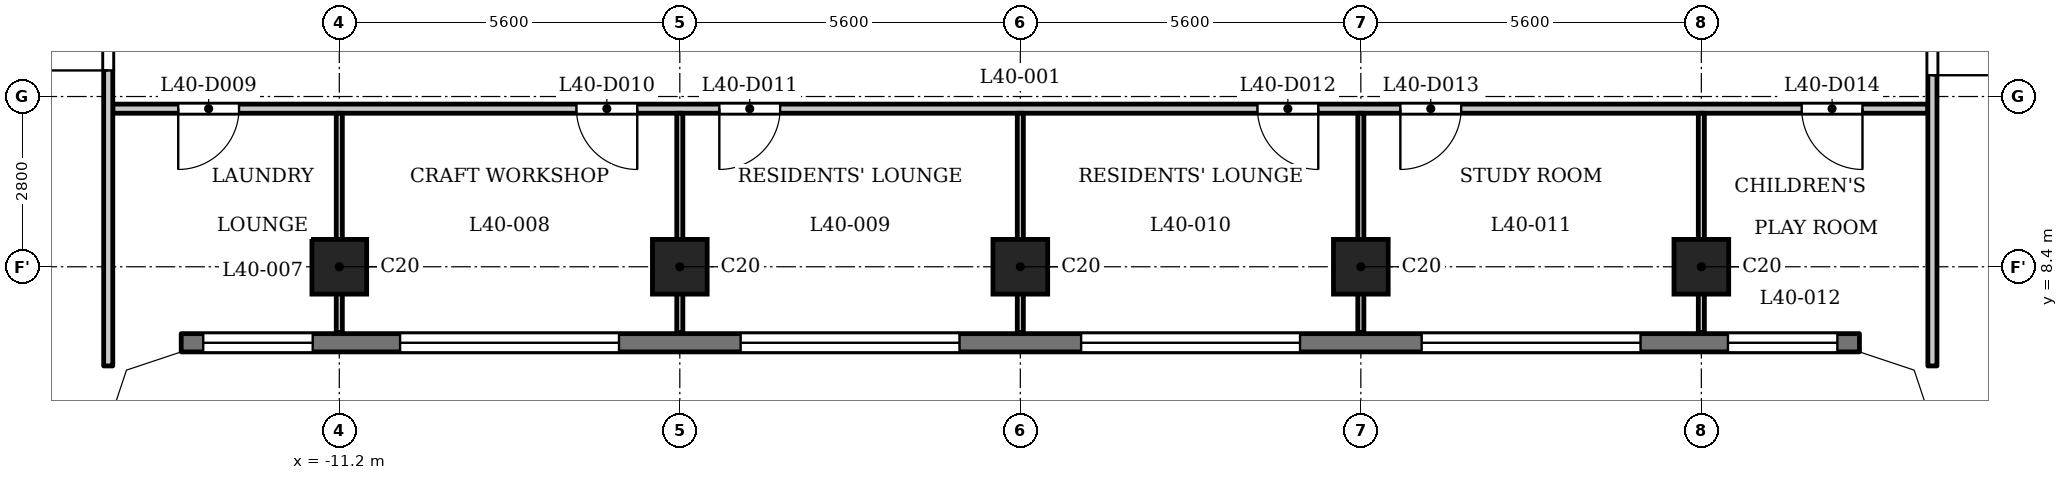
"""IFC4 building model, lengths in metres.
Left out: names, types, materials, properties, quantities, classifications, styles, units other than length and angle.
Written with IfcOpenShell. Run it as: python <this file> out.ifc"""

import sys

from ifc_helpers import new_model, si_unit, direction, frame, frame_2d, origin, origin_2d, place, context, subcontext, project, spatial, polyline, rectangle, outline, extrude, element, fill, save


model = new_model("IFC4")
c1 = context("Model", 3, precision=1e-05, world=origin(), true_north=direction((0.0, 1.0)))
c2 = subcontext(c1, "Body", "Model", "MODEL_VIEW")
j1 = project(units=[si_unit("LENGTHUNIT", "METRE"), si_unit("PLANEANGLEUNIT", "RADIAN")], contexts=[c1])
p1 = place(None, origin())
s1 = spatial("IfcSite", under=j1, at=p1, CompositionType="ELEMENT")
p2 = place(p1, origin())
s2 = spatial("IfcBuilding", under=s1, at=p2, CompositionType="ELEMENT")
p3 = place(p2, frame((0.0, 0.0, 157.1)))
s3 = spatial("IfcBuildingStorey", under=s2, at=p3, CompositionType="ELEMENT", Elevation=157.1)
for number, where, z_axis, x_axis in (
    (1, (-11.2, 8.4, 0.0), (0.0, 0.0, 1.0), (1.0, 0.0, 0.0)),
    (2, (-5.6, 8.4, 0.0), (0.0, 0.0, 1.0), (1.0, 0.0, 0.0)),
    (3, (0.0, 8.4, 0.0), (0.0, 0.0, 1.0), (1.0, 0.0, 0.0)),
    (4, (5.6, 8.4, 0.0), (0.0, 0.0, 1.0), (1.0, 0.0, 0.0)),
    (5, (11.2, 8.4, 0.0), (0.0, 0.0, 1.0), (1.0, 0.0, 0.0)),
):
    element("IfcColumn", number, at=place(p3, frame(where, z_axis=z_axis, x_axis=x_axis)), inside=s3, PredefinedType="COLUMN", context=c2, shape_type="SweptSolid", body=[
        extrude(rectangle(XDim=0.9, YDim=0.9, at=origin_2d()), origin(), (0.0, 0.0, 1.0), 3.5),
    ])
p4 = place(p3, frame((-13.8, 7.15, 0.0), z_axis=(0.0, 0.0, 1.0), x_axis=(1.0, 0.0, 0.0)))
e6 = element("IfcWall", 6, at=p4, inside=s3, PredefinedType="SOLIDWALL", context=c2, shape_type="SweptSolid", body=[
    extrude(rectangle(XDim=27.6, YDim=0.3, at=frame_2d((13.8, 0.0))), origin(), (0.0, 0.0, 1.0), 3.2),
])
p5 = place(p4, frame((0.363, 0.0, 0.9)))
e7 = element("IfcOpeningElement", 7, at=p5, cuts=e6, PredefinedType="OPENING", context=c2, shape_type="SweptSolid", body=[
    extrude(rectangle(XDim=1.8, YDim=1.25, at=frame_2d((0.9, 0.625))), frame((0.0, 0.16, 0.0), z_axis=(0.0, -1.0, 0.0), x_axis=(1.0, 0.0, 0.0)), (0.0, 0.0, 1.0), 0.32),
])
p6 = place(p4, frame((3.6, 0.0, 1.2)))
e8 = element("IfcOpeningElement", 8, at=p6, cuts=e6, PredefinedType="OPENING", context=c2, shape_type="SweptSolid", body=[
    extrude(rectangle(XDim=3.6, YDim=0.95, at=frame_2d((1.8, 0.475))), frame((0.0, 0.16, 0.0), z_axis=(0.0, -1.0, 0.0), x_axis=(1.0, 0.0, 0.0)), (0.0, 0.0, 1.0), 0.32),
])
p7 = place(p4, frame((9.2, 0.0, 1.2)))
e9 = element("IfcOpeningElement", 9, at=p7, cuts=e6, PredefinedType="OPENING", context=c2, shape_type="SweptSolid", body=[
    extrude(rectangle(XDim=3.6, YDim=0.95, at=frame_2d((1.8, 0.475))), frame((0.0, 0.16, 0.0), z_axis=(0.0, -1.0, 0.0), x_axis=(1.0, 0.0, 0.0)), (0.0, 0.0, 1.0), 0.32),
])
p8 = place(p4, frame((14.8, 0.0, 1.2)))
e10 = element("IfcOpeningElement", 10, at=p8, cuts=e6, PredefinedType="OPENING", context=c2, shape_type="SweptSolid", body=[
    extrude(rectangle(XDim=3.6, YDim=0.95, at=frame_2d((1.8, 0.475))), frame((0.0, 0.16, 0.0), z_axis=(0.0, -1.0, 0.0), x_axis=(1.0, 0.0, 0.0)), (0.0, 0.0, 1.0), 0.32),
])
p9 = place(p4, frame((20.4, 0.0, 1.2)))
e11 = element("IfcOpeningElement", 11, at=p9, cuts=e6, PredefinedType="OPENING", context=c2, shape_type="SweptSolid", body=[
    extrude(rectangle(XDim=3.6, YDim=0.95, at=frame_2d((1.8, 0.475))), frame((0.0, 0.16, 0.0), z_axis=(0.0, -1.0, 0.0), x_axis=(1.0, 0.0, 0.0)), (0.0, 0.0, 1.0), 0.32),
])
p10 = place(p4, frame((25.438, 0.0, 0.9)))
e12 = element("IfcOpeningElement", 12, at=p10, cuts=e6, PredefinedType="OPENING", context=c2, shape_type="SweptSolid", body=[
    extrude(rectangle(XDim=1.8, YDim=1.25, at=frame_2d((0.9, 0.625))), frame((0.0, 0.16, 0.0), z_axis=(0.0, -1.0, 0.0), x_axis=(1.0, 0.0, 0.0)), (0.0, 0.0, 1.0), 0.32),
])
p11 = place(p3, frame((-14.925, 11.0, 0.0), z_axis=(0.0, 0.0, 1.0), x_axis=(1.0, 0.0, 0.0)))
e13 = element("IfcWall", 13, at=p11, inside=s3, PredefinedType="PARTITIONING", context=c2, shape_type="SweptSolid", body=[
    extrude(rectangle(XDim=29.85, YDim=0.15, at=frame_2d((14.925, 0.0))), origin(), (0.0, 0.0, 1.0), 3.2),
])
p12 = place(p11, frame((1.076, 0.0, 0.0)))
e14 = element("IfcOpeningElement", 14, at=p12, cuts=e13, PredefinedType="OPENING", context=c2, shape_type="SweptSolid", body=[
    extrude(rectangle(XDim=1.0, YDim=2.1, at=frame_2d((0.5, 1.05))), frame((0.0, 0.085, 0.0), z_axis=(0.0, -1.0, 0.0), x_axis=(1.0, 0.0, 0.0)), (0.0, 0.0, 1.0), 0.17),
])
p13 = place(p11, frame((7.625, 0.0, 0.0)))
e15 = element("IfcOpeningElement", 15, at=p13, cuts=e13, PredefinedType="OPENING", context=c2, shape_type="SweptSolid", body=[
    extrude(rectangle(XDim=1.0, YDim=2.1, at=frame_2d((0.5, 1.05))), frame((0.0, 0.085, 0.0), z_axis=(0.0, -1.0, 0.0), x_axis=(1.0, 0.0, 0.0)), (0.0, 0.0, 1.0), 0.17),
])
p14 = place(p11, frame((9.975, 0.0, 0.0)))
e16 = element("IfcOpeningElement", 16, at=p14, cuts=e13, PredefinedType="OPENING", context=c2, shape_type="SweptSolid", body=[
    extrude(rectangle(XDim=1.0, YDim=2.1, at=frame_2d((0.5, 1.05))), frame((0.0, 0.085, 0.0), z_axis=(0.0, -1.0, 0.0), x_axis=(1.0, 0.0, 0.0)), (0.0, 0.0, 1.0), 0.17),
])
p15 = place(p11, frame((18.825, 0.0, 0.0)))
e17 = element("IfcOpeningElement", 17, at=p15, cuts=e13, PredefinedType="OPENING", context=c2, shape_type="SweptSolid", body=[
    extrude(rectangle(XDim=1.0, YDim=2.1, at=frame_2d((0.5, 1.05))), frame((0.0, 0.085, 0.0), z_axis=(0.0, -1.0, 0.0), x_axis=(1.0, 0.0, 0.0)), (0.0, 0.0, 1.0), 0.17),
])
p16 = place(p11, frame((21.175, 0.0, 0.0)))
e18 = element("IfcOpeningElement", 18, at=p16, cuts=e13, PredefinedType="OPENING", context=c2, shape_type="SweptSolid", body=[
    extrude(rectangle(XDim=1.0, YDim=2.1, at=frame_2d((0.5, 1.05))), frame((0.0, 0.085, 0.0), z_axis=(0.0, -1.0, 0.0), x_axis=(1.0, 0.0, 0.0)), (0.0, 0.0, 1.0), 0.17),
])
p17 = place(p11, frame((27.775, 0.0, 0.0)))
e19 = element("IfcOpeningElement", 19, at=p17, cuts=e13, PredefinedType="OPENING", context=c2, shape_type="SweptSolid", body=[
    extrude(rectangle(XDim=1.0, YDim=2.1, at=frame_2d((0.5, 1.05))), frame((0.0, 0.085, 0.0), z_axis=(0.0, -1.0, 0.0), x_axis=(1.0, 0.0, 0.0)), (0.0, 0.0, 1.0), 0.17),
])
p18 = place(p3, frame((-15.0, 6.769, 0.0), z_axis=(0.0, 0.0, 1.0), x_axis=(0.0, 1.0, 0.0)))
e20 = element("IfcWall", 20, at=p18, inside=s3, PredefinedType="PARTITIONING", context=c2, shape_type="SweptSolid", body=[
    extrude(rectangle(XDim=6.356, YDim=0.15, at=frame_2d((3.178, 0.0))), origin(), (0.0, 0.0, 1.0), 3.2),
])
p19 = place(p18, frame((4.86, 0.0, 0.0)))
e21 = element("IfcOpeningElement", 21, at=p19, cuts=e20, PredefinedType="OPENING", context=c2, shape_type="SweptSolid", body=[
    extrude(rectangle(XDim=1.0, YDim=2.1, at=frame_2d((0.5, 1.05))), frame((0.0, 0.085, 0.0), z_axis=(0.0, -1.0, 0.0), x_axis=(1.0, 0.0, 0.0)), (0.0, 0.0, 1.0), 0.17),
])
for number, where, z_axis, x_axis in (
    (22, (-11.2, 7.32, 0.0), (0.0, 0.0, 1.0), (0.0, 1.0, 0.0)),
    (23, (-5.6, 7.32, 0.0), (0.0, 0.0, 1.0), (0.0, 1.0, 0.0)),
    (24, (0.0, 7.32, 0.0), (0.0, 0.0, 1.0), (0.0, 1.0, 0.0)),
    (25, (5.6, 7.32, 0.0), (0.0, 0.0, 1.0), (0.0, 1.0, 0.0)),
    (26, (11.2, 7.32, 0.0), (0.0, 0.0, 1.0), (0.0, 1.0, 0.0)),
):
    element("IfcWall", number, at=place(p3, frame(where, z_axis=z_axis, x_axis=x_axis)), inside=s3, PredefinedType="PARTITIONING", context=c2, shape_type="SweptSolid", body=[
        extrude(rectangle(XDim=3.605, YDim=0.1, at=frame_2d((1.802, 0.0))), origin(), (0.0, 0.0, 1.0), 3.2),
    ])
p20 = place(p3, frame((15.0, 6.769, 0.0), z_axis=(0.0, 0.0, 1.0), x_axis=(0.0, 1.0, 0.0)))
e27 = element("IfcWall", 27, at=p20, inside=s3, PredefinedType="PARTITIONING", context=c2, shape_type="SweptSolid", body=[
    extrude(rectangle(XDim=6.356, YDim=0.15, at=frame_2d((3.178, 0.0))), origin(), (0.0, 0.0, 1.0), 3.2),
])
p21 = place(p20, frame((4.781, 0.0, 0.0)))
e28 = element("IfcOpeningElement", 28, at=p21, cuts=e27, PredefinedType="OPENING", context=c2, shape_type="SweptSolid", body=[
    extrude(rectangle(XDim=1.0, YDim=2.1, at=frame_2d((0.5, 1.05))), frame((0.0, 0.085, 0.0), z_axis=(0.0, -1.0, 0.0), x_axis=(1.0, 0.0, 0.0)), (0.0, 0.0, 1.0), 0.17),
])
p22 = place(p3, origin())
e29 = element("IfcWall", 29, at=p22, inside=s3, PredefinedType="SOLIDWALL", context=c2, shape_type="SweptSolid", body=[
    extrude(outline(polyline([(-13.849, 7.3), (-14.937, 6.937), (-15.3, 5.849), (-15.3, 5.8), (-15.0, 5.8), (-14.7, 6.7), (-13.8, 7.0), (-13.8, 7.3), (-13.849, 7.3)])), origin(), (0.0, 0.0, 1.0), 3.2),
])
e30 = element("IfcWall", 30, at=p22, inside=s3, PredefinedType="SOLIDWALL", context=c2, shape_type="SweptSolid", body=[
    extrude(outline(polyline([(14.937, 6.937), (13.849, 7.3), (13.8, 7.3), (13.8, 7.0), (14.7, 6.7), (15.0, 5.8), (15.3, 5.8), (15.3, 5.849), (14.937, 6.937)])), origin(), (0.0, 0.0, 1.0), 3.2),
])
p23 = place(p19, origin())
e31 = element("IfcDoor", 31, at=p23, inside=s3, OperationType="SINGLE_SWING_RIGHT", PredefinedType="DOOR", context=c2, shape_type="SweptSolid", body=[
    extrude(rectangle(XDim=1.0, YDim=2.1, at=frame_2d((0.5, 1.05))), frame((0.0, 0.025, 0.0), z_axis=(0.0, -1.0, 0.0), x_axis=(1.0, 0.0, 0.0)), (0.0, 0.0, 1.0), 0.05),
])
fill(e21, e31)
p24 = place(p21, origin())
e32 = element("IfcDoor", 32, at=p24, inside=s3, OperationType="SINGLE_SWING_LEFT", PredefinedType="DOOR", context=c2, shape_type="SweptSolid", body=[
    extrude(rectangle(XDim=1.0, YDim=2.1, at=frame_2d((0.5, 1.05))), frame((0.0, 0.025, 0.0), z_axis=(0.0, -1.0, 0.0), x_axis=(1.0, 0.0, 0.0)), (0.0, 0.0, 1.0), 0.05),
])
fill(e28, e32)
p25 = place(p12, origin())
e33 = element("IfcDoor", 33, at=p25, inside=s3, OperationType="SINGLE_SWING_LEFT", PredefinedType="DOOR", context=c2, shape_type="SweptSolid", body=[
    extrude(rectangle(XDim=1.0, YDim=2.1, at=frame_2d((0.5, 1.05))), frame((0.0, 0.025, 0.0), z_axis=(0.0, -1.0, 0.0), x_axis=(1.0, 0.0, 0.0)), (0.0, 0.0, 1.0), 0.05),
])
fill(e14, e33)
p26 = place(p13, origin())
e34 = element("IfcDoor", 34, at=p26, inside=s3, OperationType="SINGLE_SWING_RIGHT", PredefinedType="DOOR", context=c2, shape_type="SweptSolid", body=[
    extrude(rectangle(XDim=1.0, YDim=2.1, at=frame_2d((0.5, 1.05))), frame((0.0, 0.025, 0.0), z_axis=(0.0, -1.0, 0.0), x_axis=(1.0, 0.0, 0.0)), (0.0, 0.0, 1.0), 0.05),
])
fill(e15, e34)
p27 = place(p14, origin())
e35 = element("IfcDoor", 35, at=p27, inside=s3, OperationType="SINGLE_SWING_LEFT", PredefinedType="DOOR", context=c2, shape_type="SweptSolid", body=[
    extrude(rectangle(XDim=1.0, YDim=2.1, at=frame_2d((0.5, 1.05))), frame((0.0, 0.025, 0.0), z_axis=(0.0, -1.0, 0.0), x_axis=(1.0, 0.0, 0.0)), (0.0, 0.0, 1.0), 0.05),
])
fill(e16, e35)
p28 = place(p15, origin())
e36 = element("IfcDoor", 36, at=p28, inside=s3, OperationType="SINGLE_SWING_RIGHT", PredefinedType="DOOR", context=c2, shape_type="SweptSolid", body=[
    extrude(rectangle(XDim=1.0, YDim=2.1, at=frame_2d((0.5, 1.05))), frame((0.0, 0.025, 0.0), z_axis=(0.0, -1.0, 0.0), x_axis=(1.0, 0.0, 0.0)), (0.0, 0.0, 1.0), 0.05),
])
fill(e17, e36)
p29 = place(p16, origin())
e37 = element("IfcDoor", 37, at=p29, inside=s3, OperationType="SINGLE_SWING_LEFT", PredefinedType="DOOR", context=c2, shape_type="SweptSolid", body=[
    extrude(rectangle(XDim=1.0, YDim=2.1, at=frame_2d((0.5, 1.05))), frame((0.0, 0.025, 0.0), z_axis=(0.0, -1.0, 0.0), x_axis=(1.0, 0.0, 0.0)), (0.0, 0.0, 1.0), 0.05),
])
fill(e18, e37)
p30 = place(p17, origin())
e38 = element("IfcDoor", 38, at=p30, inside=s3, OperationType="SINGLE_SWING_RIGHT", PredefinedType="DOOR", context=c2, shape_type="SweptSolid", body=[
    extrude(rectangle(XDim=1.0, YDim=2.1, at=frame_2d((0.5, 1.05))), frame((0.0, 0.025, 0.0), z_axis=(0.0, -1.0, 0.0), x_axis=(1.0, 0.0, 0.0)), (0.0, 0.0, 1.0), 0.05),
])
fill(e19, e38)
p31 = place(p5, origin())
e39 = element("IfcWindow", 39, at=p31, inside=s3, PartitioningType="SINGLE_PANEL", PredefinedType="WINDOW", context=c2, shape_type="SweptSolid", body=[
    extrude(rectangle(XDim=1.8, YDim=1.25, at=frame_2d((0.9, 0.625))), frame((0.0, 0.03, 0.0), z_axis=(0.0, -1.0, 0.0), x_axis=(1.0, 0.0, 0.0)), (0.0, 0.0, 1.0), 0.06),
])
fill(e7, e39)
p32 = place(p6, origin())
e40 = element("IfcWindow", 40, at=p32, inside=s3, PartitioningType="SINGLE_PANEL", PredefinedType="WINDOW", context=c2, shape_type="SweptSolid", body=[
    extrude(rectangle(XDim=3.6, YDim=0.95, at=frame_2d((1.8, 0.475))), frame((0.0, 0.03, 0.0), z_axis=(0.0, -1.0, 0.0), x_axis=(1.0, 0.0, 0.0)), (0.0, 0.0, 1.0), 0.06),
])
fill(e8, e40)
p33 = place(p7, origin())
e41 = element("IfcWindow", 41, at=p33, inside=s3, PartitioningType="SINGLE_PANEL", PredefinedType="WINDOW", context=c2, shape_type="SweptSolid", body=[
    extrude(rectangle(XDim=3.6, YDim=0.95, at=frame_2d((1.8, 0.475))), frame((0.0, 0.03, 0.0), z_axis=(0.0, -1.0, 0.0), x_axis=(1.0, 0.0, 0.0)), (0.0, 0.0, 1.0), 0.06),
])
fill(e9, e41)
p34 = place(p8, origin())
e42 = element("IfcWindow", 42, at=p34, inside=s3, PartitioningType="SINGLE_PANEL", PredefinedType="WINDOW", context=c2, shape_type="SweptSolid", body=[
    extrude(rectangle(XDim=3.6, YDim=0.95, at=frame_2d((1.8, 0.475))), frame((0.0, 0.03, 0.0), z_axis=(0.0, -1.0, 0.0), x_axis=(1.0, 0.0, 0.0)), (0.0, 0.0, 1.0), 0.06),
])
fill(e10, e42)
p35 = place(p9, origin())
e43 = element("IfcWindow", 43, at=p35, inside=s3, PartitioningType="SINGLE_PANEL", PredefinedType="WINDOW", context=c2, shape_type="SweptSolid", body=[
    extrude(rectangle(XDim=3.6, YDim=0.95, at=frame_2d((1.8, 0.475))), frame((0.0, 0.03, 0.0), z_axis=(0.0, -1.0, 0.0), x_axis=(1.0, 0.0, 0.0)), (0.0, 0.0, 1.0), 0.06),
])
fill(e11, e43)
p36 = place(p10, origin())
e44 = element("IfcWindow", 44, at=p36, inside=s3, PartitioningType="SINGLE_PANEL", PredefinedType="WINDOW", context=c2, shape_type="SweptSolid", body=[
    extrude(rectangle(XDim=1.8, YDim=1.25, at=frame_2d((0.9, 0.625))), frame((0.0, 0.03, 0.0), z_axis=(0.0, -1.0, 0.0), x_axis=(1.0, 0.0, 0.0)), (0.0, 0.0, 1.0), 0.06),
])
fill(e12, e44)
save(model, sys.argv[1])
